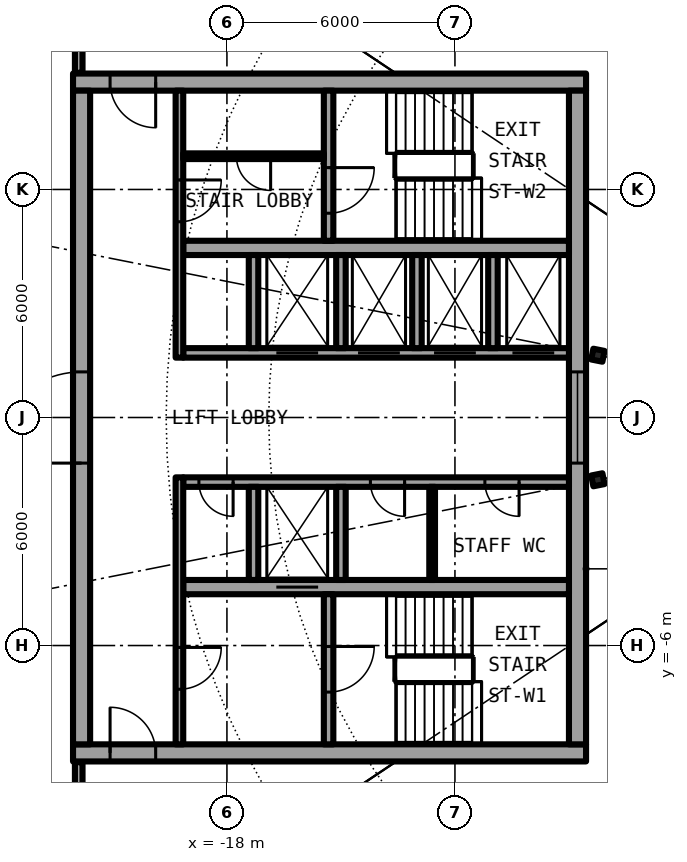
"""IFC4 building model, lengths in metres.
Left out: names, types, materials, properties, quantities, classifications, styles, units other than length and angle.
Written with IfcOpenShell. Run it as: python <this file> out.ifc"""

import sys

from ifc_helpers import new_model, si_unit, direction, frame, frame_2d, origin, origin_2d, place, context, subcontext, project, spatial, rectangle, i_section, extrude, element, fill, save


model = new_model("IFC4")
c1 = context("Model", 3, precision=1e-05, world=origin(), true_north=direction((0.0, 1.0)))
c2 = subcontext(c1, "Body", "Model", "MODEL_VIEW")
j1 = project(units=[si_unit("LENGTHUNIT", "METRE"), si_unit("PLANEANGLEUNIT", "RADIAN")], contexts=[c1])
p1 = place(None, origin())
s1 = spatial("IfcSite", under=j1, at=p1, CompositionType="ELEMENT")
p2 = place(p1, origin())
s2 = spatial("IfcBuilding", under=s1, at=p2, CompositionType="ELEMENT")
p3 = place(p2, frame((0.0, 0.0, 221.85)))
s3 = spatial("IfcBuildingStorey", under=s2, at=p3, CompositionType="ELEMENT", Elevation=221.85)
for number, where, z_axis, x_axis in (
    (1, (-8.239, 1.639, 0.0), (0.0, 0.0, 1.0), (-0.981, 0.195, 0.0)),
    (2, (-8.239, -1.639, 0.0), (0.0, 0.0, 1.0), (-0.981, -0.195, 0.0)),
):
    element("IfcColumn", number, at=place(p3, frame(where, z_axis=z_axis, x_axis=x_axis)), inside=s3, PredefinedType="COLUMN", context=c2, shape_type="SweptSolid", body=[
        extrude(i_section(OverallWidth=0.3, OverallDepth=0.29, WebThickness=0.009, FlangeThickness=0.014, FilletRadius=0.027, at=origin_2d()), origin(), (0.0, 0.0, 1.0), 6.1),
    ])
p4 = place(p3, frame((-22.05, -8.825, 0.0), z_axis=(0.0, 0.0, 1.0), x_axis=(1.0, 0.0, 0.0)))
e3 = element("IfcWall", 3, at=p4, inside=s3, PredefinedType="SHEAR", context=c2, shape_type="SweptSolid", body=[
    extrude(rectangle(XDim=13.5, YDim=0.45, at=frame_2d((6.75, 0.0))), origin(), (0.0, 0.0, 1.0), 6.1),
])
p5 = place(p4, frame((0.975, 0.0, 0.0)))
e4 = element("IfcOpeningElement", 4, at=p5, cuts=e3, PredefinedType="OPENING", context=c2, shape_type="SweptSolid", body=[
    extrude(rectangle(XDim=1.2, YDim=2.3, at=frame_2d((0.6, 1.15))), frame((0.0, 0.235, 0.0), z_axis=(0.0, -1.0, 0.0), x_axis=(1.0, 0.0, 0.0)), (0.0, 0.0, 1.0), 0.47),
])
p6 = place(p3, frame((-8.55, 8.825, 0.0), z_axis=(0.0, 0.0, 1.0), x_axis=(-1.0, 0.0, 0.0)))
e5 = element("IfcWall", 5, at=p6, inside=s3, PredefinedType="SHEAR", context=c2, shape_type="SweptSolid", body=[
    extrude(rectangle(XDim=13.5, YDim=0.45, at=frame_2d((6.75, 0.0))), origin(), (0.0, 0.0, 1.0), 6.1),
])
p7 = place(p6, frame((11.325, 0.0, 0.0)))
e6 = element("IfcOpeningElement", 6, at=p7, cuts=e5, PredefinedType="OPENING", context=c2, shape_type="SweptSolid", body=[
    extrude(rectangle(XDim=1.2, YDim=2.3, at=frame_2d((0.6, 1.15))), frame((0.0, 0.235, 0.0), z_axis=(0.0, -1.0, 0.0), x_axis=(1.0, 0.0, 0.0)), (0.0, 0.0, 1.0), 0.47),
])
p8 = place(p3, frame((-21.825, -8.6, 0.0), z_axis=(0.0, 0.0, 1.0), x_axis=(0.0, 1.0, 0.0)))
e7 = element("IfcWall", 7, at=p8, inside=s3, PredefinedType="SHEAR", context=c2, shape_type="SweptSolid", body=[
    extrude(rectangle(XDim=17.2, YDim=0.45, at=frame_2d((8.6, 0.0))), origin(), (0.0, 0.0, 1.0), 6.1),
])
p9 = place(p8, frame((7.4, 0.0, 0.0)))
e8 = element("IfcOpeningElement", 8, at=p9, cuts=e7, PredefinedType="OPENING", context=c2, shape_type="SweptSolid", body=[
    extrude(rectangle(XDim=2.4, YDim=2.3, at=frame_2d((1.2, 1.15))), frame((0.0, 0.235, 0.0), z_axis=(0.0, -1.0, 0.0), x_axis=(1.0, 0.0, 0.0)), (0.0, 0.0, 1.0), 0.47),
])
p10 = place(p3, frame((-8.775, 8.6, 0.0), z_axis=(0.0, 0.0, 1.0), x_axis=(0.0, -1.0, 0.0)))
e9 = element("IfcWall", 9, at=p10, inside=s3, PredefinedType="SHEAR", context=c2, shape_type="SweptSolid", body=[
    extrude(rectangle(XDim=17.2, YDim=0.45, at=frame_2d((8.6, 0.0))), origin(), (0.0, 0.0, 1.0), 6.1),
])
p11 = place(p10, frame((7.4, 0.0, 0.1)))
e10 = element("IfcOpeningElement", 10, at=p11, cuts=e9, PredefinedType="OPENING", context=c2, shape_type="SweptSolid", body=[
    extrude(rectangle(XDim=2.4, YDim=2.2, at=frame_2d((1.2, 1.1))), frame((0.0, 0.235, 0.0), z_axis=(0.0, -1.0, 0.0), x_axis=(1.0, 0.0, 0.0)), (0.0, 0.0, 1.0), 0.47),
])
p12 = place(p3, frame((-9.0, -1.7, 0.0), z_axis=(0.0, 0.0, 1.0), x_axis=(-1.0, 0.0, 0.0)))
e11 = element("IfcWall", 11, at=p12, inside=s3, PredefinedType="SHEAR", context=c2, shape_type="SweptSolid", body=[
    extrude(rectangle(XDim=10.15, YDim=0.25, at=frame_2d((5.075, 0.0))), origin(), (0.0, 0.0, 1.0), 6.1),
])
p13 = place(p12, frame((1.312, 0.0, 0.0)))
e12 = element("IfcOpeningElement", 12, at=p13, cuts=e11, PredefinedType="OPENING", context=c2, shape_type="SweptSolid", body=[
    extrude(rectangle(XDim=0.9, YDim=2.3, at=frame_2d((0.45, 1.15))), frame((0.0, 0.135, 0.0), z_axis=(0.0, -1.0, 0.0), x_axis=(1.0, 0.0, 0.0)), (0.0, 0.0, 1.0), 0.27),
])
p14 = place(p12, frame((4.325, 0.0, 0.0)))
e13 = element("IfcOpeningElement", 13, at=p14, cuts=e11, PredefinedType="OPENING", context=c2, shape_type="SweptSolid", body=[
    extrude(rectangle(XDim=0.9, YDim=2.3, at=frame_2d((0.45, 1.15))), frame((0.0, 0.135, 0.0), z_axis=(0.0, -1.0, 0.0), x_axis=(1.0, 0.0, 0.0)), (0.0, 0.0, 1.0), 0.27),
])
p15 = place(p12, frame((8.837, 0.0, 0.0)))
e14 = element("IfcOpeningElement", 14, at=p15, cuts=e11, PredefinedType="OPENING", context=c2, shape_type="SweptSolid", body=[
    extrude(rectangle(XDim=0.9, YDim=2.3, at=frame_2d((0.45, 1.15))), frame((0.0, 0.135, 0.0), z_axis=(0.0, -1.0, 0.0), x_axis=(1.0, 0.0, 0.0)), (0.0, 0.0, 1.0), 0.27),
])
p16 = place(p3, frame((-9.0, -4.462, 0.0), z_axis=(0.0, 0.0, 1.0), x_axis=(-1.0, 0.0, 0.0)))
e15 = element("IfcWall", 15, at=p16, inside=s3, PredefinedType="SHEAR", context=c2, shape_type="SweptSolid", body=[
    extrude(rectangle(XDim=10.15, YDim=0.375, at=frame_2d((5.075, 0.0))), origin(), (0.0, 0.0, 1.0), 6.1),
])
p17 = place(p16, frame((6.6, 0.0, 0.0)))
e16 = element("IfcOpeningElement", 16, at=p17, cuts=e15, PredefinedType="OPENING", context=c2, shape_type="SweptSolid", body=[
    extrude(rectangle(XDim=1.1, YDim=2.3, at=frame_2d((0.55, 1.15))), frame((0.0, 0.198, 0.0), z_axis=(0.0, -1.0, 0.0), x_axis=(1.0, 0.0, 0.0)), (0.0, 0.0, 1.0), 0.395),
])
p18 = place(p3, frame((-15.325, -4.65, 0.0), z_axis=(0.0, 0.0, 1.0), x_axis=(0.0, -1.0, 0.0)))
e17 = element("IfcWall", 17, at=p18, inside=s3, PredefinedType="SHEAR", context=c2, shape_type="SweptSolid", body=[
    extrude(rectangle(XDim=3.95, YDim=0.25, at=frame_2d((1.975, 0.0))), origin(), (0.0, 0.0, 1.0), 6.1),
])
p19 = place(p18, frame((1.375, 0.0, 0.0)))
e18 = element("IfcOpeningElement", 18, at=p19, cuts=e17, PredefinedType="OPENING", context=c2, shape_type="SweptSolid", body=[
    extrude(rectangle(XDim=1.2, YDim=2.3, at=frame_2d((0.6, 1.15))), frame((0.0, 0.135, 0.0), z_axis=(0.0, -1.0, 0.0), x_axis=(1.0, 0.0, 0.0)), (0.0, 0.0, 1.0), 0.27),
])
for number, where, z_axis, x_axis in (
    (19, (-15.0, -1.825, 0.0), (0.0, 0.0, 1.0), (0.0, -1.0, 0.0)),
    (20, (-17.3, -1.825, 0.0), (0.0, 0.0, 1.0), (0.0, -1.0, 0.0)),
):
    element("IfcWall", number, at=place(p3, frame(where, z_axis=z_axis, x_axis=x_axis)), inside=s3, PredefinedType="SOLIDWALL", context=c2, shape_type="SweptSolid", body=[
        extrude(rectangle(XDim=2.45, YDim=0.25, at=frame_2d((1.225, 0.0))), origin(), (0.0, 0.0, 1.0), 5.75),
    ])
p20 = place(p3, frame((-19.25, -1.575, 0.0), z_axis=(0.0, 0.0, 1.0), x_axis=(0.0, -1.0, 0.0)))
e21 = element("IfcWall", 21, at=p20, inside=s3, PredefinedType="SOLIDWALL", context=c2, shape_type="SweptSolid", body=[
    extrude(rectangle(XDim=7.025, YDim=0.2, at=frame_2d((3.513, 0.0))), origin(), (0.0, 0.0, 1.0), 5.75),
])
p21 = place(p20, frame((4.475, 0.0, 0.0)))
e22 = element("IfcOpeningElement", 22, at=p21, cuts=e21, PredefinedType="OPENING", context=c2, shape_type="SweptSolid", body=[
    extrude(rectangle(XDim=1.1, YDim=2.3, at=frame_2d((0.55, 1.15))), frame((0.0, 0.11, 0.0), z_axis=(0.0, -1.0, 0.0), x_axis=(1.0, 0.0, 0.0)), (0.0, 0.0, 1.0), 0.22),
])
p22 = place(p3, frame((-9.0, 1.7, 0.0), z_axis=(0.0, 0.0, 1.0), x_axis=(-1.0, 0.0, 0.0)))
e23 = element("IfcWall", 23, at=p22, inside=s3, PredefinedType="SHEAR", context=c2, shape_type="SweptSolid", body=[
    extrude(rectangle(XDim=10.15, YDim=0.25, at=frame_2d((5.075, 0.0))), origin(), (0.0, 0.0, 1.0), 6.1),
])
p23 = place(p22, frame((0.387, 0.0, 0.0)))
e24 = element("IfcOpeningElement", 24, at=p23, cuts=e23, PredefinedType="OPENING", context=c2, shape_type="SweptSolid", body=[
    extrude(rectangle(XDim=1.1, YDim=2.3, at=frame_2d((0.55, 1.15))), frame((0.0, 0.135, 0.0), z_axis=(0.0, -1.0, 0.0), x_axis=(1.0, 0.0, 0.0)), (0.0, 0.0, 1.0), 0.27),
])
p24 = place(p22, frame((2.45, 0.0, 0.0)))
e25 = element("IfcOpeningElement", 25, at=p24, cuts=e23, PredefinedType="OPENING", context=c2, shape_type="SweptSolid", body=[
    extrude(rectangle(XDim=1.1, YDim=2.3, at=frame_2d((0.55, 1.15))), frame((0.0, 0.135, 0.0), z_axis=(0.0, -1.0, 0.0), x_axis=(1.0, 0.0, 0.0)), (0.0, 0.0, 1.0), 0.27),
])
p25 = place(p22, frame((4.45, 0.0, 0.0)))
e26 = element("IfcOpeningElement", 26, at=p25, cuts=e23, PredefinedType="OPENING", context=c2, shape_type="SweptSolid", body=[
    extrude(rectangle(XDim=1.1, YDim=2.3, at=frame_2d((0.55, 1.15))), frame((0.0, 0.135, 0.0), z_axis=(0.0, -1.0, 0.0), x_axis=(1.0, 0.0, 0.0)), (0.0, 0.0, 1.0), 0.27),
])
p26 = place(p22, frame((6.6, 0.0, 0.0)))
e27 = element("IfcOpeningElement", 27, at=p26, cuts=e23, PredefinedType="OPENING", context=c2, shape_type="SweptSolid", body=[
    extrude(rectangle(XDim=1.1, YDim=2.3, at=frame_2d((0.55, 1.15))), frame((0.0, 0.135, 0.0), z_axis=(0.0, -1.0, 0.0), x_axis=(1.0, 0.0, 0.0)), (0.0, 0.0, 1.0), 0.27),
])
p27 = place(p3, frame((-9.0, 4.462, 0.0), z_axis=(0.0, 0.0, 1.0), x_axis=(-1.0, 0.0, 0.0)))
e28 = element("IfcWall", 28, at=p27, inside=s3, PredefinedType="SHEAR", context=c2, shape_type="SweptSolid", body=[
    extrude(rectangle(XDim=10.15, YDim=0.375, at=frame_2d((5.075, 0.0))), origin(), (0.0, 0.0, 1.0), 6.1),
])
p28 = place(p3, frame((-15.325, 8.6, 0.0), z_axis=(0.0, 0.0, 1.0), x_axis=(0.0, -1.0, 0.0)))
e29 = element("IfcWall", 29, at=p28, inside=s3, PredefinedType="SHEAR", context=c2, shape_type="SweptSolid", body=[
    extrude(rectangle(XDim=3.95, YDim=0.25, at=frame_2d((1.975, 0.0))), origin(), (0.0, 0.0, 1.0), 6.1),
])
p29 = place(p28, frame((2.025, 0.0, 0.0)))
e30 = element("IfcOpeningElement", 30, at=p29, cuts=e29, PredefinedType="OPENING", context=c2, shape_type="SweptSolid", body=[
    extrude(rectangle(XDim=1.2, YDim=2.3, at=frame_2d((0.6, 1.15))), frame((0.0, 0.135, 0.0), z_axis=(0.0, -1.0, 0.0), x_axis=(1.0, 0.0, 0.0)), (0.0, 0.0, 1.0), 0.27),
])
for number, where, z_axis, x_axis in (
    (31, (-15.0, 1.825, 0.0), (0.0, 0.0, 1.0), (0.0, 1.0, 0.0)),
    (32, (-17.3, 1.825, 0.0), (0.0, 0.0, 1.0), (0.0, 1.0, 0.0)),
):
    element("IfcWall", number, at=place(p3, frame(where, z_axis=z_axis, x_axis=x_axis)), inside=s3, PredefinedType="SOLIDWALL", context=c2, shape_type="SweptSolid", body=[
        extrude(rectangle(XDim=2.45, YDim=0.25, at=frame_2d((1.225, 0.0))), origin(), (0.0, 0.0, 1.0), 5.75),
    ])
p30 = place(p3, frame((-19.25, 8.6, 0.0), z_axis=(0.0, 0.0, 1.0), x_axis=(0.0, -1.0, 0.0)))
e33 = element("IfcWall", 33, at=p30, inside=s3, PredefinedType="SOLIDWALL", context=c2, shape_type="SweptSolid", body=[
    extrude(rectangle(XDim=7.025, YDim=0.2, at=frame_2d((3.513, 0.0))), origin(), (0.0, 0.0, 1.0), 5.75),
])
p31 = place(p30, frame((2.35, 0.0, 0.0)))
e34 = element("IfcOpeningElement", 34, at=p31, cuts=e33, PredefinedType="OPENING", context=c2, shape_type="SweptSolid", body=[
    extrude(rectangle(XDim=1.1, YDim=2.3, at=frame_2d((0.55, 1.15))), frame((0.0, 0.11, 0.0), z_axis=(0.0, -1.0, 0.0), x_axis=(1.0, 0.0, 0.0)), (0.0, 0.0, 1.0), 0.22),
])
for number, where, z_axis, x_axis in (
    (35, (-11.0, 1.825, 0.0), (0.0, 0.0, 1.0), (0.0, 1.0, 0.0)),
    (36, (-13.0, 1.825, 0.0), (0.0, 0.0, 1.0), (0.0, 1.0, 0.0)),
):
    element("IfcWall", number, at=place(p3, frame(where, z_axis=z_axis, x_axis=x_axis)), inside=s3, PredefinedType="SOLIDWALL", context=c2, shape_type="SweptSolid", body=[
        extrude(rectangle(XDim=2.45, YDim=0.25, at=frame_2d((1.225, 0.0))), origin(), (0.0, 0.0, 1.0), 5.75),
    ])
p32 = place(p3, frame((-12.6, -1.825, 0.0), z_axis=(0.0, 0.0, 1.0), x_axis=(0.0, -1.0, 0.0)))
e37 = element("IfcWall", 37, at=p32, inside=s3, PredefinedType="PARTITIONING", context=c2, shape_type="SweptSolid", body=[
    extrude(rectangle(XDim=2.45, YDim=0.15, at=frame_2d((1.225, 0.0))), origin(), (0.0, 0.0, 1.0), 5.75),
])
p33 = place(p3, frame((-15.45, 6.875, 0.0), z_axis=(0.0, 0.0, 1.0), x_axis=(-1.0, 0.0, 0.0)))
e38 = element("IfcWall", 38, at=p33, inside=s3, PredefinedType="PARTITIONING", context=c2, shape_type="SweptSolid", body=[
    extrude(rectangle(XDim=3.7, YDim=0.15, at=frame_2d((1.85, 0.0))), origin(), (0.0, 0.0, 1.0), 5.75),
])
p34 = place(p33, frame((1.4, 0.0, 0.0)))
e39 = element("IfcOpeningElement", 39, at=p34, cuts=e38, PredefinedType="OPENING", context=c2, shape_type="SweptSolid", body=[
    extrude(rectangle(XDim=0.9, YDim=2.3, at=frame_2d((0.45, 1.15))), frame((0.0, 0.085, 0.0), z_axis=(0.0, -1.0, 0.0), x_axis=(1.0, 0.0, 0.0)), (0.0, 0.0, 1.0), 0.17),
])
p35 = place(p3, frame((-10.45, -25.23, 0.0), z_axis=(0.0, 0.0, 1.0), x_axis=(0.382637007118, 0.923898761112, 0.0)))
e40 = element("IfcWall", 40, at=p35, inside=s3, PredefinedType="PARTITIONING", context=c2, shape_type="SweptSolid", body=[
    extrude(rectangle(XDim=17.489, YDim=0.15, at=frame_2d((8.744, 0.0))), origin(), (0.0, 0.0, 1.0), 5.75),
])
for number, where, z_axis, x_axis in (
    (41, (-21.9, -12.47, 0.0), (0.0, 0.0, 1.0), (0.0, 1.0, 0.0)),
    (42, (-21.9, 9.07, 0.0), (0.0, 0.0, 1.0), (0.0, 1.0, 0.0)),
):
    element("IfcWall", number, at=place(p3, frame(where, z_axis=z_axis, x_axis=x_axis)), inside=s3, PredefinedType="PARTITIONING", context=c2, shape_type="SweptSolid", body=[
        extrude(rectangle(XDim=3.4, YDim=0.2, at=frame_2d((1.7, 0.0))), origin(), (0.0, 0.0, 1.0), 5.75),
    ])
p36 = place(p17, origin())
e43 = element("IfcDoor", 43, at=p36, inside=s3, OperationType="DOUBLE_DOOR_SLIDING", PredefinedType="DOOR", context=c2, shape_type="SweptSolid", body=[
    extrude(rectangle(XDim=1.1, YDim=2.3, at=frame_2d((0.55, 1.15))), frame((0.0, 0.025, 0.0), z_axis=(0.0, -1.0, 0.0), x_axis=(1.0, 0.0, 0.0)), (0.0, 0.0, 1.0), 0.05),
])
fill(e16, e43)
p37 = place(p23, origin())
e44 = element("IfcDoor", 44, at=p37, inside=s3, OperationType="DOUBLE_DOOR_SLIDING", PredefinedType="DOOR", context=c2, shape_type="SweptSolid", body=[
    extrude(rectangle(XDim=1.1, YDim=2.3, at=frame_2d((0.55, 1.15))), frame((0.0, 0.025, 0.0), z_axis=(0.0, -1.0, 0.0), x_axis=(1.0, 0.0, 0.0)), (0.0, 0.0, 1.0), 0.05),
])
fill(e24, e44)
p38 = place(p24, origin())
e45 = element("IfcDoor", 45, at=p38, inside=s3, OperationType="DOUBLE_DOOR_SLIDING", PredefinedType="DOOR", context=c2, shape_type="SweptSolid", body=[
    extrude(rectangle(XDim=1.1, YDim=2.3, at=frame_2d((0.55, 1.15))), frame((0.0, 0.025, 0.0), z_axis=(0.0, -1.0, 0.0), x_axis=(1.0, 0.0, 0.0)), (0.0, 0.0, 1.0), 0.05),
])
fill(e25, e45)
p39 = place(p25, origin())
e46 = element("IfcDoor", 46, at=p39, inside=s3, OperationType="DOUBLE_DOOR_SLIDING", PredefinedType="DOOR", context=c2, shape_type="SweptSolid", body=[
    extrude(rectangle(XDim=1.1, YDim=2.3, at=frame_2d((0.55, 1.15))), frame((0.0, 0.025, 0.0), z_axis=(0.0, -1.0, 0.0), x_axis=(1.0, 0.0, 0.0)), (0.0, 0.0, 1.0), 0.05),
])
fill(e26, e46)
p40 = place(p26, origin())
e47 = element("IfcDoor", 47, at=p40, inside=s3, OperationType="DOUBLE_DOOR_SLIDING", PredefinedType="DOOR", context=c2, shape_type="SweptSolid", body=[
    extrude(rectangle(XDim=1.1, YDim=2.3, at=frame_2d((0.55, 1.15))), frame((0.0, 0.025, 0.0), z_axis=(0.0, -1.0, 0.0), x_axis=(1.0, 0.0, 0.0)), (0.0, 0.0, 1.0), 0.05),
])
fill(e27, e47)
p41 = place(p13, origin())
e48 = element("IfcDoor", 48, at=p41, inside=s3, OperationType="SINGLE_SWING_RIGHT", PredefinedType="DOOR", context=c2, shape_type="SweptSolid", body=[
    extrude(rectangle(XDim=0.9, YDim=2.3, at=frame_2d((0.45, 1.15))), frame((0.0, 0.025, 0.0), z_axis=(0.0, -1.0, 0.0), x_axis=(1.0, 0.0, 0.0)), (0.0, 0.0, 1.0), 0.05),
])
fill(e12, e48)
p42 = place(p14, origin())
e49 = element("IfcDoor", 49, at=p42, inside=s3, OperationType="SINGLE_SWING_RIGHT", PredefinedType="DOOR", context=c2, shape_type="SweptSolid", body=[
    extrude(rectangle(XDim=0.9, YDim=2.3, at=frame_2d((0.45, 1.15))), frame((0.0, 0.025, 0.0), z_axis=(0.0, -1.0, 0.0), x_axis=(1.0, 0.0, 0.0)), (0.0, 0.0, 1.0), 0.05),
])
fill(e13, e49)
p43 = place(p15, origin())
e50 = element("IfcDoor", 50, at=p43, inside=s3, OperationType="SINGLE_SWING_LEFT", PredefinedType="DOOR", context=c2, shape_type="SweptSolid", body=[
    extrude(rectangle(XDim=0.9, YDim=2.3, at=frame_2d((0.45, 1.15))), frame((0.0, 0.025, 0.0), z_axis=(0.0, -1.0, 0.0), x_axis=(1.0, 0.0, 0.0)), (0.0, 0.0, 1.0), 0.05),
])
fill(e14, e50)
p44 = place(p34, origin())
e51 = element("IfcDoor", 51, at=p44, inside=s3, OperationType="SINGLE_SWING_LEFT", PredefinedType="DOOR", context=c2, shape_type="SweptSolid", body=[
    extrude(rectangle(XDim=0.9, YDim=2.3, at=frame_2d((0.45, 1.15))), frame((0.0, 0.025, 0.0), z_axis=(0.0, -1.0, 0.0), x_axis=(1.0, 0.0, 0.0)), (0.0, 0.0, 1.0), 0.05),
])
fill(e39, e51)
p45 = place(p19, origin())
e52 = element("IfcDoor", 52, at=p45, inside=s3, OperationType="SINGLE_SWING_LEFT", PredefinedType="DOOR", context=c2, shape_type="SweptSolid", body=[
    extrude(rectangle(XDim=1.2, YDim=2.3, at=frame_2d((0.6, 1.15))), frame((0.0, 0.025, 0.0), z_axis=(0.0, -1.0, 0.0), x_axis=(1.0, 0.0, 0.0)), (0.0, 0.0, 1.0), 0.05),
])
fill(e18, e52)
p46 = place(p29, origin())
e53 = element("IfcDoor", 53, at=p46, inside=s3, OperationType="SINGLE_SWING_LEFT", PredefinedType="DOOR", context=c2, shape_type="SweptSolid", body=[
    extrude(rectangle(XDim=1.2, YDim=2.3, at=frame_2d((0.6, 1.15))), frame((0.0, 0.025, 0.0), z_axis=(0.0, -1.0, 0.0), x_axis=(1.0, 0.0, 0.0)), (0.0, 0.0, 1.0), 0.05),
])
fill(e30, e53)
p47 = place(p21, origin())
e54 = element("IfcDoor", 54, at=p47, inside=s3, OperationType="SINGLE_SWING_LEFT", PredefinedType="DOOR", context=c2, shape_type="SweptSolid", body=[
    extrude(rectangle(XDim=1.1, YDim=2.3, at=frame_2d((0.55, 1.15))), frame((0.0, 0.025, 0.0), z_axis=(0.0, -1.0, 0.0), x_axis=(1.0, 0.0, 0.0)), (0.0, 0.0, 1.0), 0.05),
])
fill(e22, e54)
p48 = place(p31, origin())
e55 = element("IfcDoor", 55, at=p48, inside=s3, OperationType="SINGLE_SWING_RIGHT", PredefinedType="DOOR", context=c2, shape_type="SweptSolid", body=[
    extrude(rectangle(XDim=1.1, YDim=2.3, at=frame_2d((0.55, 1.15))), frame((0.0, 0.025, 0.0), z_axis=(0.0, -1.0, 0.0), x_axis=(1.0, 0.0, 0.0)), (0.0, 0.0, 1.0), 0.05),
])
fill(e34, e55)
p49 = place(p5, origin())
e56 = element("IfcDoor", 56, at=p49, inside=s3, OperationType="SINGLE_SWING_RIGHT", PredefinedType="DOOR", context=c2, shape_type="SweptSolid", body=[
    extrude(rectangle(XDim=1.2, YDim=2.3, at=frame_2d((0.6, 1.15))), frame((0.0, 0.025, 0.0), z_axis=(0.0, -1.0, 0.0), x_axis=(1.0, 0.0, 0.0)), (0.0, 0.0, 1.0), 0.05),
])
fill(e4, e56)
p50 = place(p7, origin())
e57 = element("IfcDoor", 57, at=p50, inside=s3, OperationType="SINGLE_SWING_LEFT", PredefinedType="DOOR", context=c2, shape_type="SweptSolid", body=[
    extrude(rectangle(XDim=1.2, YDim=2.3, at=frame_2d((0.6, 1.15))), frame((0.0, 0.025, 0.0), z_axis=(0.0, -1.0, 0.0), x_axis=(1.0, 0.0, 0.0)), (0.0, 0.0, 1.0), 0.05),
])
fill(e6, e57)
p51 = place(p9, origin())
e58 = element("IfcDoor", 58, at=p51, inside=s3, OperationType="SINGLE_SWING_LEFT", PredefinedType="DOOR", context=c2, shape_type="SweptSolid", body=[
    extrude(rectangle(XDim=2.4, YDim=2.3, at=frame_2d((1.2, 1.15))), frame((0.0, 0.025, 0.0), z_axis=(0.0, -1.0, 0.0), x_axis=(1.0, 0.0, 0.0)), (0.0, 0.0, 1.0), 0.05),
])
fill(e8, e58)
p52 = place(p11, origin())
e59 = element("IfcWindow", 59, at=p52, inside=s3, PartitioningType="SINGLE_PANEL", PredefinedType="WINDOW", context=c2, shape_type="SweptSolid", body=[
    extrude(rectangle(XDim=2.4, YDim=2.2, at=frame_2d((1.2, 1.1))), frame((0.0, 0.03, 0.0), z_axis=(0.0, -1.0, 0.0), x_axis=(1.0, 0.0, 0.0)), (0.0, 0.0, 1.0), 0.06),
])
fill(e10, e59)
save(model, sys.argv[1])
